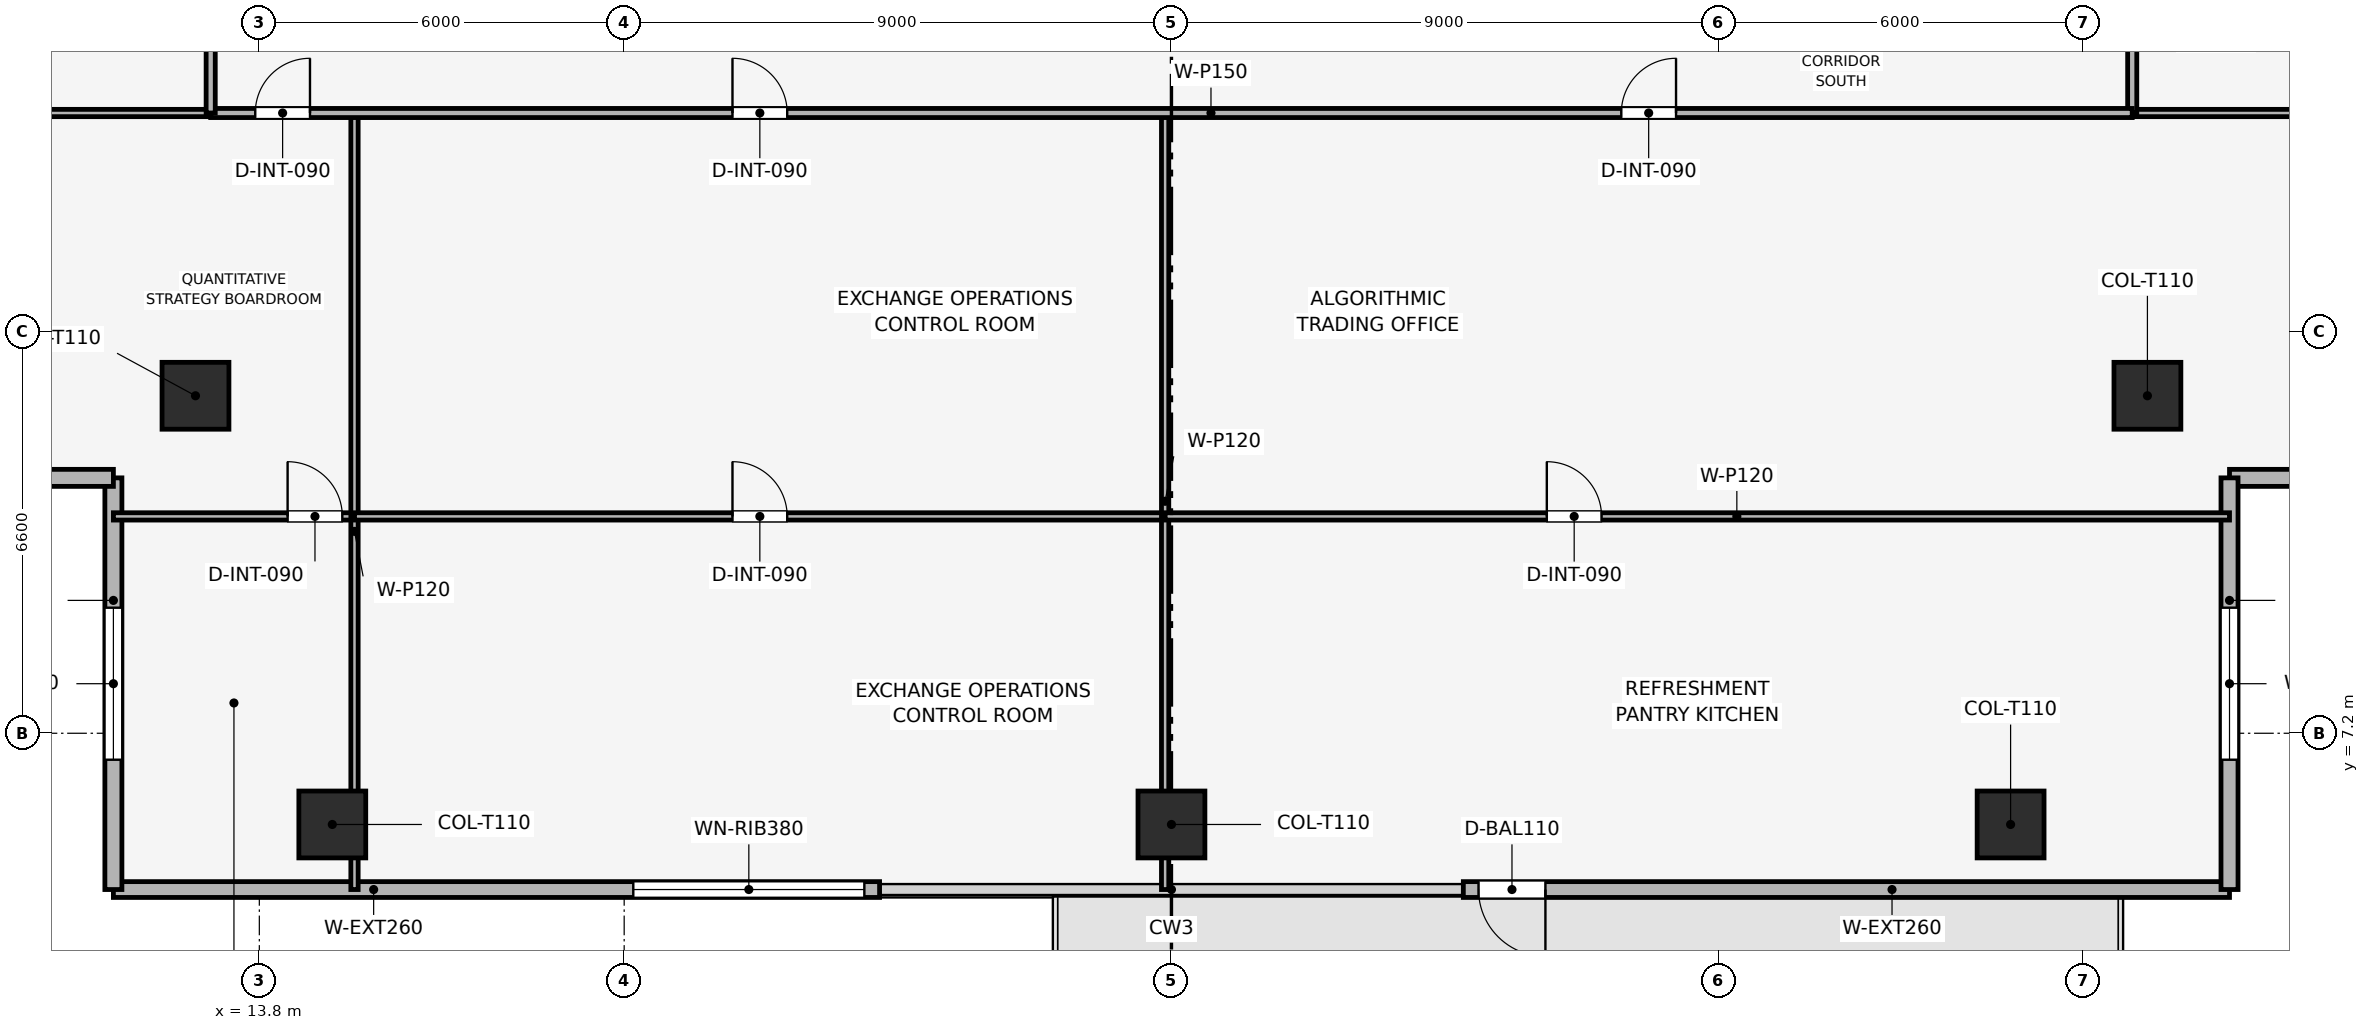
"""IFC4 building model, lengths in metres.
Left out: names, types, materials, properties, quantities, classifications, styles, units other than length and angle.
Written with IfcOpenShell. Run it as: python <this file> out.ifc"""

import sys

from ifc_helpers import new_model, si_unit, direction, frame, frame_2d, origin, origin_2d, place, context, subcontext, project, spatial, rectangle, extrude, element, fill, save


model = new_model("IFC4")
c1 = context("Model", 3, precision=1e-05, world=origin(), true_north=direction((0.0, 1.0)))
c2 = subcontext(c1, "Body", "Model", "MODEL_VIEW")
j1 = project(units=[si_unit("LENGTHUNIT", "METRE"), si_unit("PLANEANGLEUNIT", "RADIAN")], contexts=[c1])
p1 = place(None, origin())
s1 = spatial("IfcSite", under=j1, at=p1, CompositionType="ELEMENT")
p2 = place(p1, origin())
s2 = spatial("IfcBuilding", under=s1, at=p2, CompositionType="ELEMENT")
p3 = place(p2, frame((0.0, 0.0, 142.05)))
s3 = spatial("IfcBuildingStorey", under=s2, at=p3, CompositionType="ELEMENT", Elevation=142.05)
for number, where, z_axis, x_axis in (
    (1, (15.0, 5.7, 0.003), (0.0, 0.0, 1.0), (1.0, 0.0, 0.0)),
    (2, (28.8, 5.7, 0.003), (0.0, 0.0, 1.0), (1.0, 0.0, 0.0)),
    (3, (42.6, 5.7, 0.003), (0.0, 0.0, 1.0), (1.0, 0.0, 0.0)),
    (4, (12.75, 12.75, 0.003), (0.0, 0.0, 1.0), (1.0, 0.0, 0.0)),
    (5, (44.85, 12.75, 0.003), (0.0, 0.0, 1.0), (1.0, 0.0, 0.0)),
):
    element("IfcColumn", number, at=place(p3, frame(where, z_axis=z_axis, x_axis=x_axis)), inside=s3, PredefinedType="COLUMN", context=c2, shape_type="SweptSolid", body=[
        extrude(rectangle(XDim=1.1, YDim=1.1, at=origin_2d()), origin(), (0.0, 0.0, 1.0), 3.489),
    ])
p4 = place(p3, frame((46.2, 4.63, 0.0), z_axis=(0.0, 0.0, 1.0), x_axis=(-1.0, 0.0, 0.0)))
e6 = element("IfcWall", 6, at=p4, inside=s3, PredefinedType="SOLIDWALL", context=c2, shape_type="SweptSolid", body=[
    extrude(rectangle(XDim=12.6, YDim=0.26, at=frame_2d((6.3, 0.0))), origin(), (0.0, 0.0, 1.0), 3.495),
])
p5 = place(p4, frame((11.25, 0.0, 0.0)))
e7 = element("IfcOpeningElement", 7, at=p5, cuts=e6, PredefinedType="OPENING", context=c2, shape_type="SweptSolid", body=[
    extrude(rectangle(XDim=1.1, YDim=2.2, at=frame_2d((0.55, 1.1))), frame((0.0, 0.14, 0.0), z_axis=(0.0, -1.0, 0.0), x_axis=(1.0, 0.0, 0.0)), (0.0, 0.0, 1.0), 0.28),
])
p6 = place(p3, frame((24.0, 4.63, 0.0), z_axis=(0.0, 0.0, 1.0), x_axis=(-1.0, 0.0, 0.0)))
e8 = element("IfcWall", 8, at=p6, inside=s3, PredefinedType="SOLIDWALL", context=c2, shape_type="SweptSolid", body=[
    extrude(rectangle(XDim=12.6, YDim=0.26, at=frame_2d((6.3, 0.0))), origin(), (0.0, 0.0, 1.0), 3.495),
])
p7 = place(p6, frame((0.25, 0.0, 0.9)))
e9 = element("IfcOpeningElement", 9, at=p7, cuts=e8, PredefinedType="OPENING", context=c2, shape_type="SweptSolid", body=[
    extrude(rectangle(XDim=3.8, YDim=1.9, at=frame_2d((1.9, 0.95))), frame((0.0, 0.14, 0.0), z_axis=(0.0, -1.0, 0.0), x_axis=(1.0, 0.0, 0.0)), (0.0, 0.0, 1.0), 0.28),
])
p8 = place(p3, frame((11.4, 4.63, 0.0), z_axis=(0.0, 0.0, 1.0), x_axis=(0.0, 1.0, 0.0)))
e10 = element("IfcWall", 10, at=p8, inside=s3, PredefinedType="SOLIDWALL", context=c2, shape_type="SweptSolid", body=[
    extrude(rectangle(XDim=6.77, YDim=0.28, at=frame_2d((3.385, 0.0))), origin(), (0.0, 0.0, 1.0), 3.495),
])
p9 = place(p8, frame((2.135, 0.0, 0.9)))
e11 = element("IfcOpeningElement", 11, at=p9, cuts=e10, PredefinedType="OPENING", context=c2, shape_type="SweptSolid", body=[
    extrude(rectangle(XDim=2.5, YDim=1.9, at=frame_2d((1.25, 0.95))), frame((0.0, 0.15, 0.0), z_axis=(0.0, -1.0, 0.0), x_axis=(1.0, 0.0, 0.0)), (0.0, 0.0, 1.0), 0.3),
])
p10 = place(p3, frame((11.4, 11.4, 0.0), z_axis=(0.0, 0.0, 1.0), x_axis=(-1.0, 0.0, 0.0)))
e12 = element("IfcWall", 12, at=p10, inside=s3, PredefinedType="SOLIDWALL", context=c2, shape_type="SweptSolid", body=[
    extrude(rectangle(XDim=6.77, YDim=0.28, at=frame_2d((3.385, 0.0))), origin(), (0.0, 0.0, 1.0), 3.495),
])
p11 = place(p10, frame((2.135, 0.0, 0.9)))
e13 = element("IfcOpeningElement", 13, at=p11, cuts=e12, PredefinedType="OPENING", context=c2, shape_type="SweptSolid", body=[
    extrude(rectangle(XDim=2.5, YDim=1.9, at=frame_2d((1.25, 0.95))), frame((0.0, 0.15, 0.0), z_axis=(0.0, -1.0, 0.0), x_axis=(1.0, 0.0, 0.0)), (0.0, 0.0, 1.0), 0.3),
])
p12 = place(p3, frame((52.97, 11.4, 0.0), z_axis=(0.0, 0.0, 1.0), x_axis=(-1.0, 0.0, 0.0)))
e14 = element("IfcWall", 14, at=p12, inside=s3, PredefinedType="SOLIDWALL", context=c2, shape_type="SweptSolid", body=[
    extrude(rectangle(XDim=6.77, YDim=0.28, at=frame_2d((3.385, 0.0))), origin(), (0.0, 0.0, 1.0), 3.495),
])
p13 = place(p12, frame((2.135, 0.0, 0.9)))
e15 = element("IfcOpeningElement", 15, at=p13, cuts=e14, PredefinedType="OPENING", context=c2, shape_type="SweptSolid", body=[
    extrude(rectangle(XDim=2.5, YDim=1.9, at=frame_2d((1.25, 0.95))), frame((0.0, 0.15, 0.0), z_axis=(0.0, -1.0, 0.0), x_axis=(1.0, 0.0, 0.0)), (0.0, 0.0, 1.0), 0.3),
])
p14 = place(p3, frame((46.2, 11.4, 0.0), z_axis=(0.0, 0.0, 1.0), x_axis=(0.0, -1.0, 0.0)))
e16 = element("IfcWall", 16, at=p14, inside=s3, PredefinedType="SOLIDWALL", context=c2, shape_type="SweptSolid", body=[
    extrude(rectangle(XDim=6.77, YDim=0.28, at=frame_2d((3.385, 0.0))), origin(), (0.0, 0.0, 1.0), 3.495),
])
p15 = place(p14, frame((2.135, 0.0, 0.9)))
e17 = element("IfcOpeningElement", 17, at=p15, cuts=e16, PredefinedType="OPENING", context=c2, shape_type="SweptSolid", body=[
    extrude(rectangle(XDim=2.5, YDim=1.9, at=frame_2d((1.25, 0.95))), frame((0.0, 0.15, 0.0), z_axis=(0.0, -1.0, 0.0), x_axis=(1.0, 0.0, 0.0)), (0.0, 0.0, 1.0), 0.3),
])
p16 = place(p3, frame((11.4, 10.766, 0.0), z_axis=(0.0, 0.0, 1.0), x_axis=(1.0, 0.0, 0.0)))
e18 = element("IfcWall", 18, at=p16, inside=s3, PredefinedType="PARTITIONING", context=c2, shape_type="SweptSolid", body=[
    extrude(rectangle(XDim=3.965, YDim=0.12, at=frame_2d((1.982, 0.0))), origin(), (0.0, 0.0, 1.0), 2.98),
])
p17 = place(p16, frame((2.865, 0.0, 0.0)))
e19 = element("IfcOpeningElement", 19, at=p17, cuts=e18, PredefinedType="OPENING", context=c2, shape_type="SweptSolid", body=[
    extrude(rectangle(XDim=0.9, YDim=2.1, at=frame_2d((0.45, 1.05))), frame((0.0, 0.07, 0.0), z_axis=(0.0, -1.0, 0.0), x_axis=(1.0, 0.0, 0.0)), (0.0, 0.0, 1.0), 0.14),
])
p18 = place(p3, frame((15.365, 4.63, 0.0), z_axis=(0.0, 0.0, 1.0), x_axis=(0.0, 1.0, 0.0)))
e20 = element("IfcWall", 20, at=p18, inside=s3, PredefinedType="PARTITIONING", context=c2, shape_type="SweptSolid", body=[
    extrude(rectangle(XDim=12.77, YDim=0.12, at=frame_2d((6.385, 0.0))), origin(), (0.0, 0.0, 1.0), 2.98),
])
p19 = place(p3, frame((15.365, 10.766, 0.0), z_axis=(0.0, 0.0, 1.0), x_axis=(1.0, 0.0, 0.0)))
e21 = element("IfcWall", 21, at=p19, inside=s3, PredefinedType="PARTITIONING", context=c2, shape_type="SweptSolid", body=[
    extrude(rectangle(XDim=13.331, YDim=0.12, at=frame_2d((6.666, 0.0))), origin(), (0.0, 0.0, 1.0), 3.03),
])
p20 = place(p19, frame((6.216, 0.0, 0.0)))
e22 = element("IfcOpeningElement", 22, at=p20, cuts=e21, PredefinedType="OPENING", context=c2, shape_type="SweptSolid", body=[
    extrude(rectangle(XDim=0.9, YDim=2.1, at=frame_2d((0.45, 1.05))), frame((0.0, 0.07, 0.0), z_axis=(0.0, -1.0, 0.0), x_axis=(1.0, 0.0, 0.0)), (0.0, 0.0, 1.0), 0.14),
])
p21 = place(p3, frame((28.696, 4.63, 0.0), z_axis=(0.0, 0.0, 1.0), x_axis=(0.0, 1.0, 0.0)))
e23 = element("IfcWall", 23, at=p21, inside=s3, PredefinedType="PARTITIONING", context=c2, shape_type="SweptSolid", body=[
    extrude(rectangle(XDim=12.77, YDim=0.12, at=frame_2d((6.385, 0.0))), origin(), (0.0, 0.0, 1.0), 2.98),
])
p22 = place(p3, frame((28.696, 10.766, 0.0), z_axis=(0.0, 0.0, 1.0), x_axis=(1.0, 0.0, 0.0)))
e24 = element("IfcWall", 24, at=p22, inside=s3, PredefinedType="PARTITIONING", context=c2, shape_type="SweptSolid", body=[
    extrude(rectangle(XDim=17.504, YDim=0.12, at=frame_2d((8.752, 0.0))), origin(), (0.0, 0.0, 1.0), 2.98),
])
p23 = place(p22, frame((6.277, 0.0, 0.0)))
e25 = element("IfcOpeningElement", 25, at=p23, cuts=e24, PredefinedType="OPENING", context=c2, shape_type="SweptSolid", body=[
    extrude(rectangle(XDim=0.9, YDim=2.1, at=frame_2d((0.45, 1.05))), frame((0.0, 0.07, 0.0), z_axis=(0.0, -1.0, 0.0), x_axis=(1.0, 0.0, 0.0)), (0.0, 0.0, 1.0), 0.14),
])
p24 = place(p3, frame((4.63, 17.4, 0.0), z_axis=(0.0, 0.0, 1.0), x_axis=(1.0, 0.0, 0.0)))
e26 = element("IfcWall", 26, at=p24, inside=s3, PredefinedType="PARTITIONING", context=c2, shape_type="SweptSolid", body=[
    extrude(rectangle(XDim=8.37, YDim=0.12, at=frame_2d((4.185, 0.0))), origin(), (0.0, 0.0, 1.0), 2.98),
])
p25 = place(p3, frame((44.6, 17.4, 0.0), z_axis=(0.0, 0.0, 1.0), x_axis=(1.0, 0.0, 0.0)))
e27 = element("IfcWall", 27, at=p25, inside=s3, PredefinedType="PARTITIONING", context=c2, shape_type="SweptSolid", body=[
    extrude(rectangle(XDim=8.37, YDim=0.12, at=frame_2d((4.185, 0.0))), origin(), (0.0, 0.0, 1.0), 2.98),
])
p26 = place(p3, frame((44.6, 17.4, 0.0), z_axis=(0.0, 0.0, 1.0), x_axis=(0.0, 1.0, 0.0)))
e28 = element("IfcWall", 28, at=p26, inside=s3, PredefinedType="PARTITIONING", context=c2, shape_type="SweptSolid", body=[
    extrude(rectangle(XDim=2.4, YDim=0.15, at=frame_2d((1.2, 0.0))), origin(), (0.0, 0.0, 1.0), 3.495),
])
p27 = place(p3, frame((13.0, 17.4, 0.0), z_axis=(0.0, 0.0, 1.0), x_axis=(1.0, 0.0, 0.0)))
e29 = element("IfcWall", 29, at=p27, inside=s3, PredefinedType="PARTITIONING", context=c2, shape_type="SweptSolid", body=[
    extrude(rectangle(XDim=31.6, YDim=0.15, at=frame_2d((15.8, 0.0))), origin(), (0.0, 0.0, 1.0), 3.03),
])
p28 = place(p27, frame((0.733, 0.0, 0.0)))
e30 = element("IfcOpeningElement", 30, at=p28, cuts=e29, PredefinedType="OPENING", context=c2, shape_type="SweptSolid", body=[
    extrude(rectangle(XDim=0.9, YDim=2.1, at=frame_2d((0.45, 1.05))), frame((0.0, 0.085, 0.0), z_axis=(0.0, -1.0, 0.0), x_axis=(1.0, 0.0, 0.0)), (0.0, 0.0, 1.0), 0.17),
])
p29 = place(p27, frame((8.581, 0.0, 0.0)))
e31 = element("IfcOpeningElement", 31, at=p29, cuts=e29, PredefinedType="OPENING", context=c2, shape_type="SweptSolid", body=[
    extrude(rectangle(XDim=0.9, YDim=2.1, at=frame_2d((0.45, 1.05))), frame((0.0, 0.085, 0.0), z_axis=(0.0, -1.0, 0.0), x_axis=(1.0, 0.0, 0.0)), (0.0, 0.0, 1.0), 0.17),
])
p30 = place(p27, frame((23.198, 0.0, 0.0)))
e32 = element("IfcOpeningElement", 32, at=p30, cuts=e29, PredefinedType="OPENING", context=c2, shape_type="SweptSolid", body=[
    extrude(rectangle(XDim=0.9, YDim=2.1, at=frame_2d((0.45, 1.05))), frame((0.0, 0.085, 0.0), z_axis=(0.0, -1.0, 0.0), x_axis=(1.0, 0.0, 0.0)), (0.0, 0.0, 1.0), 0.17),
])
p31 = place(p3, frame((13.0, 17.4, 0.0), z_axis=(0.0, 0.0, 1.0), x_axis=(0.0, 1.0, 0.0)))
e33 = element("IfcWall", 33, at=p31, inside=s3, PredefinedType="PARTITIONING", context=c2, shape_type="SweptSolid", body=[
    extrude(rectangle(XDim=22.8, YDim=0.15, at=frame_2d((11.4, 0.0))), origin(), (0.0, 0.0, 1.0), 3.03),
])
p32 = place(p31, frame((3.113, 0.0, 0.0)))
e34 = element("IfcOpeningElement", 34, at=p32, cuts=e33, PredefinedType="OPENING", context=c2, shape_type="SweptSolid", body=[
    extrude(rectangle(XDim=0.9, YDim=2.1, at=frame_2d((0.45, 1.05))), frame((0.0, 0.085, 0.0), z_axis=(0.0, -1.0, 0.0), x_axis=(1.0, 0.0, 0.0)), (0.0, 0.0, 1.0), 0.17),
])
p33 = place(p31, frame((7.542, 0.0, 0.0)))
e35 = element("IfcOpeningElement", 35, at=p33, cuts=e33, PredefinedType="OPENING", context=c2, shape_type="SweptSolid", body=[
    extrude(rectangle(XDim=0.9, YDim=2.1, at=frame_2d((0.45, 1.05))), frame((0.0, 0.085, 0.0), z_axis=(0.0, -1.0, 0.0), x_axis=(1.0, 0.0, 0.0)), (0.0, 0.0, 1.0), 0.17),
])
p34 = place(p31, frame((15.378, 0.0, 0.0)))
e36 = element("IfcOpeningElement", 36, at=p34, cuts=e33, PredefinedType="OPENING", context=c2, shape_type="SweptSolid", body=[
    extrude(rectangle(XDim=0.9, YDim=2.1, at=frame_2d((0.45, 1.05))), frame((0.0, 0.085, 0.0), z_axis=(0.0, -1.0, 0.0), x_axis=(1.0, 0.0, 0.0)), (0.0, 0.0, 1.0), 0.17),
])
p35 = place(p5, origin())
e37 = element("IfcDoor", 37, at=p35, inside=s3, OperationType="SINGLE_SWING_LEFT", PredefinedType="DOOR", context=c2, shape_type="SweptSolid", body=[
    extrude(rectangle(XDim=1.1, YDim=2.2, at=frame_2d((0.55, 1.1))), frame((0.0, 0.025, 0.0), z_axis=(0.0, -1.0, 0.0), x_axis=(1.0, 0.0, 0.0)), (0.0, 0.0, 1.0), 0.05),
])
fill(e7, e37)
p36 = place(p7, origin())
e38 = element("IfcWindow", 38, at=p36, inside=s3, PartitioningType="SINGLE_PANEL", PredefinedType="WINDOW", context=c2, shape_type="SweptSolid", body=[
    extrude(rectangle(XDim=3.8, YDim=1.9, at=frame_2d((1.9, 0.95))), frame((0.0, 0.03, 0.0), z_axis=(0.0, -1.0, 0.0), x_axis=(1.0, 0.0, 0.0)), (0.0, 0.0, 1.0), 0.06),
])
fill(e9, e38)
p37 = place(p9, origin())
e39 = element("IfcWindow", 39, at=p37, inside=s3, PartitioningType="SINGLE_PANEL", PredefinedType="WINDOW", context=c2, shape_type="SweptSolid", body=[
    extrude(rectangle(XDim=2.5, YDim=1.9, at=frame_2d((1.25, 0.95))), frame((0.0, 0.03, 0.0), z_axis=(0.0, -1.0, 0.0), x_axis=(1.0, 0.0, 0.0)), (0.0, 0.0, 1.0), 0.06),
])
fill(e11, e39)
p38 = place(p15, origin())
e40 = element("IfcWindow", 40, at=p38, inside=s3, PartitioningType="SINGLE_PANEL", PredefinedType="WINDOW", context=c2, shape_type="SweptSolid", body=[
    extrude(rectangle(XDim=2.5, YDim=1.9, at=frame_2d((1.25, 0.95))), frame((0.0, 0.03, 0.0), z_axis=(0.0, -1.0, 0.0), x_axis=(1.0, 0.0, 0.0)), (0.0, 0.0, 1.0), 0.06),
])
fill(e17, e40)
p39 = place(p17, origin())
e41 = element("IfcDoor", 41, at=p39, inside=s3, OperationType="SINGLE_SWING_LEFT", PredefinedType="DOOR", context=c2, shape_type="SweptSolid", body=[
    extrude(rectangle(XDim=0.9, YDim=2.1, at=frame_2d((0.45, 1.05))), frame((0.0, 0.025, 0.0), z_axis=(0.0, -1.0, 0.0), x_axis=(1.0, 0.0, 0.0)), (0.0, 0.0, 1.0), 0.05),
])
fill(e19, e41)
p40 = place(p20, origin())
e42 = element("IfcDoor", 42, at=p40, inside=s3, OperationType="SINGLE_SWING_LEFT", PredefinedType="DOOR", context=c2, shape_type="SweptSolid", body=[
    extrude(rectangle(XDim=0.9, YDim=2.1, at=frame_2d((0.45, 1.05))), frame((0.0, 0.025, 0.0), z_axis=(0.0, -1.0, 0.0), x_axis=(1.0, 0.0, 0.0)), (0.0, 0.0, 1.0), 0.05),
])
fill(e22, e42)
p41 = place(p23, origin())
e43 = element("IfcDoor", 43, at=p41, inside=s3, OperationType="SINGLE_SWING_LEFT", PredefinedType="DOOR", context=c2, shape_type="SweptSolid", body=[
    extrude(rectangle(XDim=0.9, YDim=2.1, at=frame_2d((0.45, 1.05))), frame((0.0, 0.025, 0.0), z_axis=(0.0, -1.0, 0.0), x_axis=(1.0, 0.0, 0.0)), (0.0, 0.0, 1.0), 0.05),
])
fill(e25, e43)
p42 = place(p28, origin())
e44 = element("IfcDoor", 44, at=p42, inside=s3, OperationType="SINGLE_SWING_RIGHT", PredefinedType="DOOR", context=c2, shape_type="SweptSolid", body=[
    extrude(rectangle(XDim=0.9, YDim=2.1, at=frame_2d((0.45, 1.05))), frame((0.0, 0.025, 0.0), z_axis=(0.0, -1.0, 0.0), x_axis=(1.0, 0.0, 0.0)), (0.0, 0.0, 1.0), 0.05),
])
fill(e30, e44)
p43 = place(p29, origin())
e45 = element("IfcDoor", 45, at=p43, inside=s3, OperationType="SINGLE_SWING_LEFT", PredefinedType="DOOR", context=c2, shape_type="SweptSolid", body=[
    extrude(rectangle(XDim=0.9, YDim=2.1, at=frame_2d((0.45, 1.05))), frame((0.0, 0.025, 0.0), z_axis=(0.0, -1.0, 0.0), x_axis=(1.0, 0.0, 0.0)), (0.0, 0.0, 1.0), 0.05),
])
fill(e31, e45)
p44 = place(p30, origin())
e46 = element("IfcDoor", 46, at=p44, inside=s3, OperationType="SINGLE_SWING_RIGHT", PredefinedType="DOOR", context=c2, shape_type="SweptSolid", body=[
    extrude(rectangle(XDim=0.9, YDim=2.1, at=frame_2d((0.45, 1.05))), frame((0.0, 0.025, 0.0), z_axis=(0.0, -1.0, 0.0), x_axis=(1.0, 0.0, 0.0)), (0.0, 0.0, 1.0), 0.05),
])
fill(e32, e46)
save(model, sys.argv[1])
